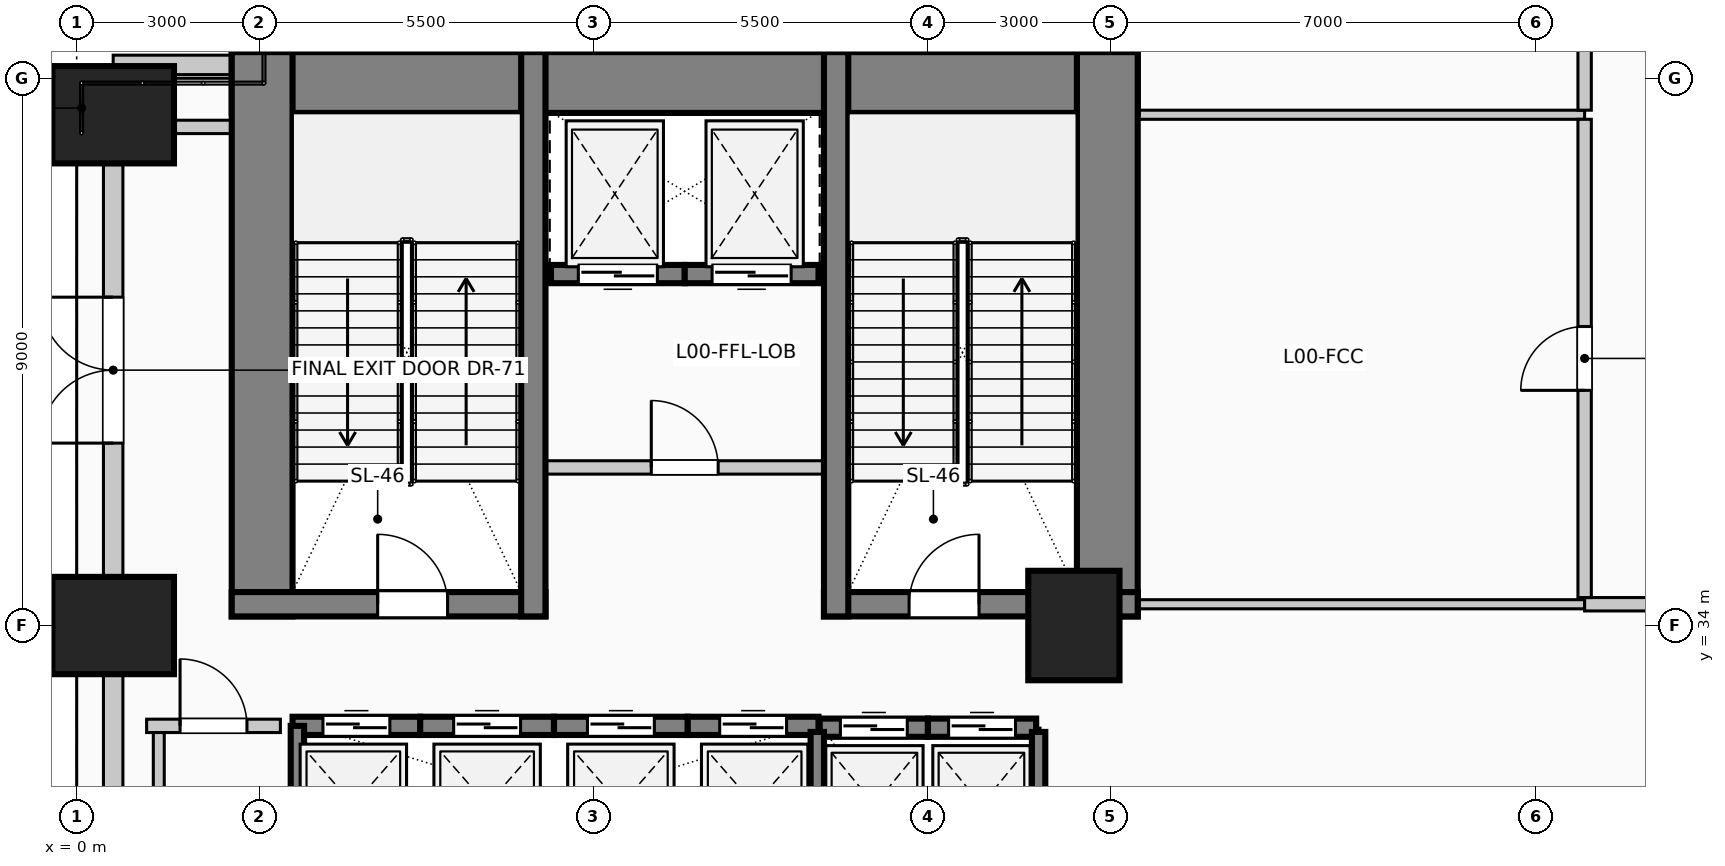
"""IFC4 building model, lengths in metres.
Left out: names, types, materials, properties, quantities, classifications, styles, units other than length and angle.
Written with IfcOpenShell. Run it as: python <this file> out.ifc"""

import sys

from ifc_helpers import new_model, si_unit, direction, frame, frame_2d, origin, origin_2d, place, context, subcontext, project, spatial, rectangle, extrude, element, fill, save


model = new_model("IFC4")
c1 = context("Model", 3, precision=1e-05, world=origin(), true_north=direction((0.0, 1.0)))
c2 = subcontext(c1, "Body", "Model", "MODEL_VIEW")
j1 = project(units=[si_unit("LENGTHUNIT", "METRE"), si_unit("PLANEANGLEUNIT", "RADIAN")], contexts=[c1])
p1 = place(None, origin())
s1 = spatial("IfcSite", under=j1, at=p1, CompositionType="ELEMENT")
p2 = place(p1, origin())
s2 = spatial("IfcBuilding", under=s1, at=p2, CompositionType="ELEMENT")
p3 = place(p2, origin())
s3 = spatial("IfcBuildingStorey", under=s2, at=p3, CompositionType="ELEMENT", Elevation=0.0)
p4 = place(p3, frame((2.55, 42.93, 0.0), z_axis=(0.0, 0.0, 1.0), x_axis=(1.0, 0.0, 0.0)))
e1 = element("IfcWall", 1, at=p4, inside=s3, PredefinedType="SHEAR", context=c2, shape_type="SweptSolid", body=[
    extrude(rectangle(XDim=14.9, YDim=1.0, at=frame_2d((7.45, 0.0))), origin(), (0.0, 0.0, 1.0), 5.4),
])
for number, where, z_axis, x_axis in (
    (2, (3.05, 34.15, 0.0), (0.0, 0.0, 1.0), (0.0, 1.0, 0.0)),
    (3, (16.95, 34.15, 0.0), (0.0, 0.0, 1.0), (0.0, 1.0, 0.0)),
):
    element("IfcWall", number, at=place(p3, frame(where, z_axis=z_axis, x_axis=x_axis)), inside=s3, PredefinedType="SHEAR", context=c2, shape_type="SweptSolid", body=[
        extrude(rectangle(XDim=9.28, YDim=1.0, at=frame_2d((4.64, 0.0))), origin(), (0.0, 0.0, 1.0), 5.4),
    ])
p5 = place(p3, frame((2.55, 34.35, 0.0), z_axis=(0.0, 0.0, 1.0), x_axis=(1.0, 0.0, 0.0)))
e4 = element("IfcWall", 4, at=p5, inside=s3, PredefinedType="SHEAR", context=c2, shape_type="SweptSolid", body=[
    extrude(rectangle(XDim=5.16, YDim=0.4, at=frame_2d((2.58, 0.0))), origin(), (0.0, 0.0, 1.0), 5.4),
])
p6 = place(p5, frame((2.4, 0.0, 0.0)))
e5 = element("IfcOpeningElement", 5, at=p6, cuts=e4, PredefinedType="OPENING", context=c2, shape_type="SweptSolid", body=[
    extrude(rectangle(XDim=1.15, YDim=2.2, at=frame_2d((0.575, 1.1))), frame((0.0, 0.21, 0.0), z_axis=(0.0, -1.0, 0.0), x_axis=(1.0, 0.0, 0.0)), (0.0, 0.0, 1.0), 0.42),
])
p7 = place(p3, frame((12.29, 34.35, 0.0), z_axis=(0.0, 0.0, 1.0), x_axis=(1.0, 0.0, 0.0)))
e6 = element("IfcWall", 6, at=p7, inside=s3, PredefinedType="SHEAR", context=c2, shape_type="SweptSolid", body=[
    extrude(rectangle(XDim=5.16, YDim=0.4, at=frame_2d((2.58, 0.0))), origin(), (0.0, 0.0, 1.0), 5.4),
])
p8 = place(p7, frame((1.4, 0.0, 0.0)))
e7 = element("IfcOpeningElement", 7, at=p8, cuts=e6, PredefinedType="OPENING", context=c2, shape_type="SweptSolid", body=[
    extrude(rectangle(XDim=1.15, YDim=2.2, at=frame_2d((0.575, 1.1))), frame((0.0, 0.21, 0.0), z_axis=(0.0, -1.0, 0.0), x_axis=(1.0, 0.0, 0.0)), (0.0, 0.0, 1.0), 0.42),
])
for number, where, z_axis, x_axis in (
    (8, (7.51, 34.15, 0.0), (0.0, 0.0, 1.0), (0.0, 1.0, 0.0)),
    (9, (12.49, 34.15, 0.0), (0.0, 0.0, 1.0), (0.0, 1.0, 0.0)),
):
    element("IfcWall", number, at=place(p3, frame(where, z_axis=z_axis, x_axis=x_axis)), inside=s3, PredefinedType="SHEAR", context=c2, shape_type="SweptSolid", body=[
        extrude(rectangle(XDim=9.28, YDim=0.4, at=frame_2d((4.64, 0.0))), origin(), (0.0, 0.0, 1.0), 5.4),
    ])
for number, where, z_axis, x_axis in (
    (10, (0.6, 34.0, 0.0), (0.0, 0.0, 1.0), (0.0, 1.0, 0.0)),
    (11, (0.6, 42.4, 0.0), (0.0, 0.0, 1.0), (0.0, 1.0, 0.0)),
):
    element("IfcColumn", number, at=place(p3, frame(where, z_axis=z_axis, x_axis=x_axis)), inside=s3, PredefinedType="COLUMN", context=c2, shape_type="SweptSolid", body=[
        extrude(rectangle(XDim=1.6, YDim=2.0, at=origin_2d()), origin(), (0.0, 0.0, 1.0), 5.4),
    ])
p9 = place(p3, frame((16.4, 34.0, 0.0), z_axis=(0.0, 0.0, 1.0), x_axis=(1.0, 0.0, 0.0)))
e12 = element("IfcColumn", 12, at=p9, inside=s3, PredefinedType="COLUMN", context=c2, shape_type="SweptSolid", body=[
    extrude(rectangle(XDim=1.5, YDim=1.8, at=origin_2d()), origin(), (0.0, 0.0, 1.0), 5.4),
])
p10 = place(p3, frame((0.6, 18.82, 0.0), z_axis=(0.0, 0.0, 1.0), x_axis=(0.0, 1.0, 0.0)))
e13 = element("IfcWall", 13, at=p10, inside=s3, PredefinedType="SOLIDWALL", context=c2, shape_type="SweptSolid", body=[
    extrude(rectangle(XDim=14.36, YDim=0.32, at=frame_2d((7.18, 0.0))), origin(), (0.0, 0.0, 1.0), 4.05),
])
p11 = place(p3, frame((0.6, 34.82, 0.0), z_axis=(0.0, 0.0, 1.0), x_axis=(0.0, 1.0, 0.0)))
e14 = element("IfcWall", 14, at=p11, inside=s3, PredefinedType="SOLIDWALL", context=c2, shape_type="SweptSolid", body=[
    extrude(rectangle(XDim=6.76, YDim=0.32, at=frame_2d((3.38, 0.0))), origin(), (0.0, 0.0, 1.0), 4.05),
])
p12 = place(p11, frame((2.18, 0.0, 0.0)))
e15 = element("IfcOpeningElement", 15, at=p12, cuts=e14, PredefinedType="OPENING", context=c2, shape_type="SweptSolid", body=[
    extrude(rectangle(XDim=2.4, YDim=2.6, at=frame_2d((1.2, 1.3))), frame((0.0, 0.17, 0.0), z_axis=(0.0, -1.0, 0.0), x_axis=(1.0, 0.0, 0.0)), (0.0, 0.0, 1.0), 0.34),
])
p13 = place(p3, frame((0.6, 43.22, 0.0), z_axis=(0.0, 0.0, 1.0), x_axis=(1.0, 0.0, 0.0)))
e16 = element("IfcWall", 16, at=p13, inside=s3, PredefinedType="SOLIDWALL", context=c2, shape_type="SweptSolid", body=[
    extrude(rectangle(XDim=1.945, YDim=0.32, at=frame_2d((0.972, 0.0))), origin(), (0.0, 0.0, 1.0), 5.0),
])
p14 = place(p3, frame((12.22, 32.32, 0.0), z_axis=(0.0, 0.0, 1.0), x_axis=(1.0, 0.0, 0.0)))
e17 = element("IfcWall", 17, at=p14, inside=s3, PredefinedType="SOLIDWALL", context=c2, shape_type="SweptSolid", body=[
    extrude(rectangle(XDim=1.78, YDim=0.3, at=frame_2d((0.89, 0.0))), origin(), (0.0, 0.0, 1.0), 5.4),
])
p15 = place(p14, frame((0.34, 0.0, 0.0)))
e18 = element("IfcOpeningElement", 18, at=p15, cuts=e17, PredefinedType="OPENING", context=c2, shape_type="SweptSolid", body=[
    extrude(rectangle(XDim=1.1, YDim=2.2, at=frame_2d((0.55, 1.1))), frame((0.0, 0.16, 0.0), z_axis=(0.0, -1.0, 0.0), x_axis=(1.0, 0.0, 0.0)), (0.0, 0.0, 1.0), 0.32),
])
p16 = place(p3, frame((14.0, 32.32, 0.0), z_axis=(0.0, 0.0, 1.0), x_axis=(1.0, 0.0, 0.0)))
e19 = element("IfcWall", 19, at=p16, inside=s3, PredefinedType="SOLIDWALL", context=c2, shape_type="SweptSolid", body=[
    extrude(rectangle(XDim=1.78, YDim=0.3, at=frame_2d((0.89, 0.0))), origin(), (0.0, 0.0, 1.0), 5.4),
])
p17 = place(p16, frame((0.34, 0.0, 0.0)))
e20 = element("IfcOpeningElement", 20, at=p17, cuts=e19, PredefinedType="OPENING", context=c2, shape_type="SweptSolid", body=[
    extrude(rectangle(XDim=1.1, YDim=2.2, at=frame_2d((0.55, 1.1))), frame((0.0, 0.16, 0.0), z_axis=(0.0, -1.0, 0.0), x_axis=(1.0, 0.0, 0.0)), (0.0, 0.0, 1.0), 0.32),
])
p18 = place(p3, frame((3.55, 32.35, 0.0), z_axis=(0.0, 0.0, 1.0), x_axis=(1.0, 0.0, 0.0)))
e21 = element("IfcWall", 21, at=p18, inside=s3, PredefinedType="SOLIDWALL", context=c2, shape_type="SweptSolid", body=[
    extrude(rectangle(XDim=2.1, YDim=0.3, at=frame_2d((1.05, 0.0))), origin(), (0.0, 0.0, 1.0), 5.4),
])
p19 = place(p18, frame((0.5, 0.0, 0.0)))
e22 = element("IfcOpeningElement", 22, at=p19, cuts=e21, PredefinedType="OPENING", context=c2, shape_type="SweptSolid", body=[
    extrude(rectangle(XDim=1.1, YDim=2.2, at=frame_2d((0.55, 1.1))), frame((0.0, 0.16, 0.0), z_axis=(0.0, -1.0, 0.0), x_axis=(1.0, 0.0, 0.0)), (0.0, 0.0, 1.0), 0.32),
])
p20 = place(p3, frame((5.65, 32.35, 0.0), z_axis=(0.0, 0.0, 1.0), x_axis=(1.0, 0.0, 0.0)))
e23 = element("IfcWall", 23, at=p20, inside=s3, PredefinedType="SOLIDWALL", context=c2, shape_type="SweptSolid", body=[
    extrude(rectangle(XDim=2.2, YDim=0.3, at=frame_2d((1.1, 0.0))), origin(), (0.0, 0.0, 1.0), 5.4),
])
p21 = place(p20, frame((0.55, 0.0, 0.0)))
e24 = element("IfcOpeningElement", 24, at=p21, cuts=e23, PredefinedType="OPENING", context=c2, shape_type="SweptSolid", body=[
    extrude(rectangle(XDim=1.1, YDim=2.2, at=frame_2d((0.55, 1.1))), frame((0.0, 0.16, 0.0), z_axis=(0.0, -1.0, 0.0), x_axis=(1.0, 0.0, 0.0)), (0.0, 0.0, 1.0), 0.32),
])
p22 = place(p3, frame((7.85, 32.35, 0.0), z_axis=(0.0, 0.0, 1.0), x_axis=(1.0, 0.0, 0.0)))
e25 = element("IfcWall", 25, at=p22, inside=s3, PredefinedType="SOLIDWALL", context=c2, shape_type="SweptSolid", body=[
    extrude(rectangle(XDim=2.2, YDim=0.3, at=frame_2d((1.1, 0.0))), origin(), (0.0, 0.0, 1.0), 5.4),
])
p23 = place(p22, frame((0.55, 0.0, 0.0)))
e26 = element("IfcOpeningElement", 26, at=p23, cuts=e25, PredefinedType="OPENING", context=c2, shape_type="SweptSolid", body=[
    extrude(rectangle(XDim=1.1, YDim=2.2, at=frame_2d((0.55, 1.1))), frame((0.0, 0.16, 0.0), z_axis=(0.0, -1.0, 0.0), x_axis=(1.0, 0.0, 0.0)), (0.0, 0.0, 1.0), 0.32),
])
p24 = place(p3, frame((10.05, 32.35, 0.0), z_axis=(0.0, 0.0, 1.0), x_axis=(1.0, 0.0, 0.0)))
e27 = element("IfcWall", 27, at=p24, inside=s3, PredefinedType="SOLIDWALL", context=c2, shape_type="SweptSolid", body=[
    extrude(rectangle(XDim=2.15, YDim=0.3, at=frame_2d((1.075, 0.0))), origin(), (0.0, 0.0, 1.0), 5.4),
])
p25 = place(p24, frame((0.525, 0.0, 0.0)))
e28 = element("IfcOpeningElement", 28, at=p25, cuts=e27, PredefinedType="OPENING", context=c2, shape_type="SweptSolid", body=[
    extrude(rectangle(XDim=1.1, YDim=2.2, at=frame_2d((0.55, 1.1))), frame((0.0, 0.16, 0.0), z_axis=(0.0, -1.0, 0.0), x_axis=(1.0, 0.0, 0.0)), (0.0, 0.0, 1.0), 0.32),
])
p26 = place(p3, frame((10.0, 39.78, 0.0), z_axis=(0.0, 0.0, 1.0), x_axis=(-1.0, 0.0, 0.0)))
e29 = element("IfcWall", 29, at=p26, inside=s3, PredefinedType="SOLIDWALL", context=c2, shape_type="SweptSolid", body=[
    extrude(rectangle(XDim=2.2, YDim=0.3, at=frame_2d((1.1, 0.0))), origin(), (0.0, 0.0, 1.0), 5.4),
])
p27 = place(p26, frame((0.45, 0.0, 0.0)))
e30 = element("IfcOpeningElement", 30, at=p27, cuts=e29, PredefinedType="OPENING", context=c2, shape_type="SweptSolid", body=[
    extrude(rectangle(XDim=1.3, YDim=2.25, at=frame_2d((0.65, 1.125))), frame((0.0, 0.16, 0.0), z_axis=(0.0, -1.0, 0.0), x_axis=(1.0, 0.0, 0.0)), (0.0, 0.0, 1.0), 0.32),
])
p28 = place(p3, frame((12.2, 39.78, 0.0), z_axis=(0.0, 0.0, 1.0), x_axis=(-1.0, 0.0, 0.0)))
e31 = element("IfcWall", 31, at=p28, inside=s3, PredefinedType="SOLIDWALL", context=c2, shape_type="SweptSolid", body=[
    extrude(rectangle(XDim=2.2, YDim=0.3, at=frame_2d((1.1, 0.0))), origin(), (0.0, 0.0, 1.0), 5.4),
])
p29 = place(p28, frame((0.45, 0.0, 0.0)))
e32 = element("IfcOpeningElement", 32, at=p29, cuts=e31, PredefinedType="OPENING", context=c2, shape_type="SweptSolid", body=[
    extrude(rectangle(XDim=1.3, YDim=2.25, at=frame_2d((0.65, 1.125))), frame((0.0, 0.16, 0.0), z_axis=(0.0, -1.0, 0.0), x_axis=(1.0, 0.0, 0.0)), (0.0, 0.0, 1.0), 0.32),
])
p30 = place(p3, frame((3.63, 26.8, 0.0), z_axis=(0.0, 0.0, 1.0), x_axis=(0.0, 1.0, 0.0)))
e33 = element("IfcWall", 33, at=p30, inside=s3, PredefinedType="SOLIDWALL", context=c2, shape_type="SweptSolid", body=[
    extrude(rectangle(XDim=5.55, YDim=0.22, at=frame_2d((2.775, 0.0))), origin(), (0.0, 0.0, 1.0), 5.4),
])
for number, where, z_axis, x_axis in (
    (34, (12.18, 26.8, 0.0), (0.0, 0.0, 1.0), (0.0, 1.0, 0.0)),
    (35, (15.82, 26.8, 0.0), (0.0, 0.0, 1.0), (0.0, 1.0, 0.0)),
):
    element("IfcWall", number, at=place(p3, frame(where, z_axis=z_axis, x_axis=x_axis)), inside=s3, PredefinedType="SOLIDWALL", context=c2, shape_type="SweptSolid", body=[
        extrude(rectangle(XDim=5.45, YDim=0.22, at=frame_2d((2.725, 0.0))), origin(), (0.0, 0.0, 1.0), 5.4),
    ])
p31 = place(p3, frame((1.15, 32.35, 0.0), z_axis=(0.0, 0.0, 1.0), x_axis=(1.0, 0.0, 0.0)))
e36 = element("IfcWall", 36, at=p31, inside=s3, PredefinedType="PARTITIONING", context=c2, shape_type="SweptSolid", body=[
    extrude(rectangle(XDim=2.2, YDim=0.22, at=frame_2d((1.1, 0.0))), origin(), (0.0, 0.0, 1.0), 5.0),
])
p32 = place(p31, frame((0.55, 0.0, 0.0)))
e37 = element("IfcOpeningElement", 37, at=p32, cuts=e36, PredefinedType="OPENING", context=c2, shape_type="SweptSolid", body=[
    extrude(rectangle(XDim=1.1, YDim=2.2, at=frame_2d((0.55, 1.1))), frame((0.0, 0.12, 0.0), z_axis=(0.0, -1.0, 0.0), x_axis=(1.0, 0.0, 0.0)), (0.0, 0.0, 1.0), 0.24),
])
p33 = place(p3, frame((7.51, 36.6, 0.0), z_axis=(0.0, 0.0, 1.0), x_axis=(1.0, 0.0, 0.0)))
e38 = element("IfcWall", 38, at=p33, inside=s3, PredefinedType="PARTITIONING", context=c2, shape_type="SweptSolid", body=[
    extrude(rectangle(XDim=4.98, YDim=0.22, at=frame_2d((2.49, 0.0))), origin(), (0.0, 0.0, 1.0), 5.0),
])
p34 = place(p33, frame((1.94, 0.0, 0.0)))
e39 = element("IfcOpeningElement", 39, at=p34, cuts=e38, PredefinedType="OPENING", context=c2, shape_type="SweptSolid", body=[
    extrude(rectangle(XDim=1.1, YDim=2.2, at=frame_2d((0.55, 1.1))), frame((0.0, 0.12, 0.0), z_axis=(0.0, -1.0, 0.0), x_axis=(1.0, 0.0, 0.0)), (0.0, 0.0, 1.0), 0.24),
])
p35 = place(p3, frame((17.45, 34.35, 0.0), z_axis=(0.0, 0.0, 1.0), x_axis=(1.0, 0.0, 0.0)))
e40 = element("IfcWall", 40, at=p35, inside=s3, PredefinedType="PARTITIONING", context=c2, shape_type="SweptSolid", body=[
    extrude(rectangle(XDim=7.35, YDim=0.15, at=frame_2d((3.675, 0.0))), origin(), (0.0, 0.0, 1.0), 4.045),
])
p36 = place(p3, frame((24.8, 34.35, 0.0), z_axis=(0.0, 0.0, 1.0), x_axis=(1.0, 0.0, 0.0)))
e41 = element("IfcWall", 41, at=p36, inside=s3, PredefinedType="PARTITIONING", context=c2, shape_type="SweptSolid", body=[
    extrude(rectangle(XDim=3.45, YDim=0.22, at=frame_2d((1.725, 0.0))), origin(), (0.0, 0.0, 1.0), 4.045),
])
p37 = place(p3, frame((1.6, 42.2, 0.0), z_axis=(0.0, 0.0, 1.0), x_axis=(1.0, 0.0, 0.0)))
e42 = element("IfcWall", 42, at=p37, inside=s3, PredefinedType="PARTITIONING", context=c2, shape_type="SweptSolid", body=[
    extrude(rectangle(XDim=0.95, YDim=0.22, at=frame_2d((0.475, 0.0))), origin(), (0.0, 0.0, 1.0), 5.0),
])
p38 = place(p3, frame((17.45, 42.4, 0.0), z_axis=(0.0, 0.0, 1.0), x_axis=(1.0, 0.0, 0.0)))
e43 = element("IfcWall", 43, at=p38, inside=s3, PredefinedType="PARTITIONING", context=c2, shape_type="SweptSolid", body=[
    extrude(rectangle(XDim=7.35, YDim=0.15, at=frame_2d((3.675, 0.0))), origin(), (0.0, 0.0, 1.0), 5.0),
])
p39 = place(p3, frame((1.35, 20.2, 0.0), z_axis=(0.0, 0.0, 1.0), x_axis=(0.0, 1.0, 0.0)))
e44 = element("IfcWall", 44, at=p39, inside=s3, PredefinedType="PARTITIONING", context=c2, shape_type="SweptSolid", body=[
    extrude(rectangle(XDim=12.04, YDim=0.18, at=frame_2d((6.02, 0.0))), origin(), (0.0, 0.0, 1.0), 5.0),
])
p40 = place(p3, frame((24.8, 34.46, 0.0), z_axis=(0.0, 0.0, 1.0), x_axis=(0.0, 1.0, 0.0)))
e45 = element("IfcWall", 45, at=p40, inside=s3, PredefinedType="PARTITIONING", context=c2, shape_type="SweptSolid", body=[
    extrude(rectangle(XDim=7.865, YDim=0.22, at=frame_2d((3.933, 0.0))), origin(), (0.0, 0.0, 1.0), 5.0),
])
p41 = place(p40, frame((3.407, 0.0, 0.0)))
e46 = element("IfcOpeningElement", 46, at=p41, cuts=e45, PredefinedType="OPENING", context=c2, shape_type="SweptSolid", body=[
    extrude(rectangle(XDim=1.05, YDim=2.15, at=frame_2d((0.525, 1.075))), frame((0.0, 0.12, 0.0), z_axis=(0.0, -1.0, 0.0), x_axis=(1.0, 0.0, 0.0)), (0.0, 0.0, 1.0), 0.24),
])
p42 = place(p3, frame((24.8, 42.475, 0.0), z_axis=(0.0, 0.0, 1.0), x_axis=(0.0, 1.0, 0.0)))
e47 = element("IfcWall", 47, at=p42, inside=s3, PredefinedType="PARTITIONING", context=c2, shape_type="SweptSolid", body=[
    extrude(rectangle(XDim=2.765, YDim=0.22, at=frame_2d((1.382, 0.0))), origin(), (0.0, 0.0, 1.0), 5.0),
])
p43 = place(p12, origin())
e48 = element("IfcDoor", 48, at=p43, inside=s3, OperationType="DOUBLE_DOOR_SINGLE_SWING", PredefinedType="DOOR", context=c2, shape_type="SweptSolid", body=[
    extrude(rectangle(XDim=2.4, YDim=2.6, at=frame_2d((1.2, 1.3))), frame((0.0, 0.025, 0.0), z_axis=(0.0, -1.0, 0.0), x_axis=(1.0, 0.0, 0.0)), (0.0, 0.0, 1.0), 0.05),
])
fill(e15, e48)
p44 = place(p15, origin())
e49 = element("IfcDoor", 49, at=p44, inside=s3, OperationType="SLIDING_TO_LEFT", PredefinedType="DOOR", context=c2, shape_type="SweptSolid", body=[
    extrude(rectangle(XDim=1.1, YDim=2.2, at=frame_2d((0.55, 1.1))), frame((0.0, 0.025, 0.0), z_axis=(0.0, -1.0, 0.0), x_axis=(1.0, 0.0, 0.0)), (0.0, 0.0, 1.0), 0.05),
])
fill(e18, e49)
p45 = place(p17, origin())
e50 = element("IfcDoor", 50, at=p45, inside=s3, OperationType="SLIDING_TO_RIGHT", PredefinedType="DOOR", context=c2, shape_type="SweptSolid", body=[
    extrude(rectangle(XDim=1.1, YDim=2.2, at=frame_2d((0.55, 1.1))), frame((0.0, 0.025, 0.0), z_axis=(0.0, -1.0, 0.0), x_axis=(1.0, 0.0, 0.0)), (0.0, 0.0, 1.0), 0.05),
])
fill(e20, e50)
p46 = place(p19, origin())
e51 = element("IfcDoor", 51, at=p46, inside=s3, OperationType="SLIDING_TO_LEFT", PredefinedType="DOOR", context=c2, shape_type="SweptSolid", body=[
    extrude(rectangle(XDim=1.1, YDim=2.2, at=frame_2d((0.55, 1.1))), frame((0.0, 0.025, 0.0), z_axis=(0.0, -1.0, 0.0), x_axis=(1.0, 0.0, 0.0)), (0.0, 0.0, 1.0), 0.05),
])
fill(e22, e51)
p47 = place(p21, origin())
e52 = element("IfcDoor", 52, at=p47, inside=s3, OperationType="SLIDING_TO_RIGHT", PredefinedType="DOOR", context=c2, shape_type="SweptSolid", body=[
    extrude(rectangle(XDim=1.1, YDim=2.2, at=frame_2d((0.55, 1.1))), frame((0.0, 0.025, 0.0), z_axis=(0.0, -1.0, 0.0), x_axis=(1.0, 0.0, 0.0)), (0.0, 0.0, 1.0), 0.05),
])
fill(e24, e52)
p48 = place(p23, origin())
e53 = element("IfcDoor", 53, at=p48, inside=s3, OperationType="SLIDING_TO_LEFT", PredefinedType="DOOR", context=c2, shape_type="SweptSolid", body=[
    extrude(rectangle(XDim=1.1, YDim=2.2, at=frame_2d((0.55, 1.1))), frame((0.0, 0.025, 0.0), z_axis=(0.0, -1.0, 0.0), x_axis=(1.0, 0.0, 0.0)), (0.0, 0.0, 1.0), 0.05),
])
fill(e26, e53)
p49 = place(p25, origin())
e54 = element("IfcDoor", 54, at=p49, inside=s3, OperationType="SLIDING_TO_RIGHT", PredefinedType="DOOR", context=c2, shape_type="SweptSolid", body=[
    extrude(rectangle(XDim=1.1, YDim=2.2, at=frame_2d((0.55, 1.1))), frame((0.0, 0.025, 0.0), z_axis=(0.0, -1.0, 0.0), x_axis=(1.0, 0.0, 0.0)), (0.0, 0.0, 1.0), 0.05),
])
fill(e28, e54)
p50 = place(p27, origin())
e55 = element("IfcDoor", 55, at=p50, inside=s3, OperationType="SLIDING_TO_LEFT", PredefinedType="DOOR", context=c2, shape_type="SweptSolid", body=[
    extrude(rectangle(XDim=1.3, YDim=2.25, at=frame_2d((0.65, 1.125))), frame((0.0, 0.025, 0.0), z_axis=(0.0, -1.0, 0.0), x_axis=(1.0, 0.0, 0.0)), (0.0, 0.0, 1.0), 0.05),
])
fill(e30, e55)
p51 = place(p29, origin())
e56 = element("IfcDoor", 56, at=p51, inside=s3, OperationType="SLIDING_TO_RIGHT", PredefinedType="DOOR", context=c2, shape_type="SweptSolid", body=[
    extrude(rectangle(XDim=1.3, YDim=2.25, at=frame_2d((0.65, 1.125))), frame((0.0, 0.025, 0.0), z_axis=(0.0, -1.0, 0.0), x_axis=(1.0, 0.0, 0.0)), (0.0, 0.0, 1.0), 0.05),
])
fill(e32, e56)
p52 = place(p6, origin())
e57 = element("IfcDoor", 57, at=p52, inside=s3, OperationType="SINGLE_SWING_LEFT", PredefinedType="DOOR", context=c2, shape_type="SweptSolid", body=[
    extrude(rectangle(XDim=1.15, YDim=2.2, at=frame_2d((0.575, 1.1))), frame((0.0, 0.025, 0.0), z_axis=(0.0, -1.0, 0.0), x_axis=(1.0, 0.0, 0.0)), (0.0, 0.0, 1.0), 0.05),
])
fill(e5, e57)
p53 = place(p8, origin())
e58 = element("IfcDoor", 58, at=p53, inside=s3, OperationType="SINGLE_SWING_RIGHT", PredefinedType="DOOR", context=c2, shape_type="SweptSolid", body=[
    extrude(rectangle(XDim=1.15, YDim=2.2, at=frame_2d((0.575, 1.1))), frame((0.0, 0.025, 0.0), z_axis=(0.0, -1.0, 0.0), x_axis=(1.0, 0.0, 0.0)), (0.0, 0.0, 1.0), 0.05),
])
fill(e7, e58)
p54 = place(p32, origin())
e59 = element("IfcDoor", 59, at=p54, inside=s3, OperationType="SINGLE_SWING_LEFT", PredefinedType="DOOR", context=c2, shape_type="SweptSolid", body=[
    extrude(rectangle(XDim=1.1, YDim=2.2, at=frame_2d((0.55, 1.1))), frame((0.0, 0.025, 0.0), z_axis=(0.0, -1.0, 0.0), x_axis=(1.0, 0.0, 0.0)), (0.0, 0.0, 1.0), 0.05),
])
fill(e37, e59)
p55 = place(p34, origin())
e60 = element("IfcDoor", 60, at=p55, inside=s3, OperationType="SINGLE_SWING_LEFT", PredefinedType="DOOR", context=c2, shape_type="SweptSolid", body=[
    extrude(rectangle(XDim=1.1, YDim=2.2, at=frame_2d((0.55, 1.1))), frame((0.0, 0.025, 0.0), z_axis=(0.0, -1.0, 0.0), x_axis=(1.0, 0.0, 0.0)), (0.0, 0.0, 1.0), 0.05),
])
fill(e39, e60)
p56 = place(p41, origin())
e61 = element("IfcDoor", 61, at=p56, inside=s3, OperationType="SINGLE_SWING_LEFT", PredefinedType="DOOR", context=c2, shape_type="SweptSolid", body=[
    extrude(rectangle(XDim=1.05, YDim=2.15, at=frame_2d((0.525, 1.075))), frame((0.0, 0.025, 0.0), z_axis=(0.0, -1.0, 0.0), x_axis=(1.0, 0.0, 0.0)), (0.0, 0.0, 1.0), 0.05),
])
fill(e46, e61)
save(model, sys.argv[1])
